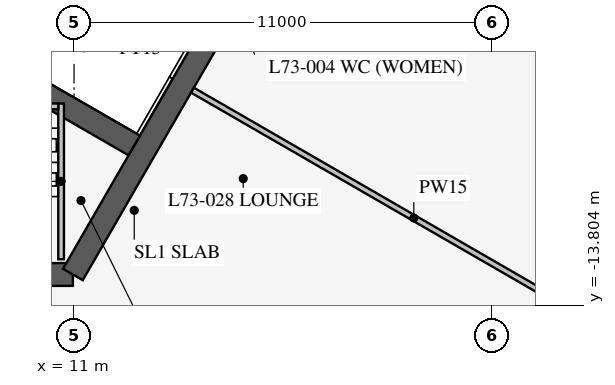
"""IFC4 building model, lengths in metres.
Left out: names, types, materials, properties, quantities, classifications, styles, units other than length and angle.
Written with IfcOpenShell. Run it as: python <this file> out.ifc"""

import sys

from ifc_helpers import new_model, si_unit, direction, frame, frame_2d, origin, place, context, subcontext, project, spatial, rectangle, extrude, element, save


model = new_model("IFC4")
c1 = context("Model", 3, precision=1e-05, world=origin(), true_north=direction((0.0, 1.0)))
c2 = subcontext(c1, "Body", "Model", "MODEL_VIEW")
j1 = project(units=[si_unit("LENGTHUNIT", "METRE"), si_unit("PLANEANGLEUNIT", "RADIAN")], contexts=[c1])
p1 = place(None, origin())
s1 = spatial("IfcSite", under=j1, at=p1, CompositionType="ELEMENT")
p2 = place(p1, origin())
s2 = spatial("IfcBuilding", under=s1, at=p2, CompositionType="ELEMENT")
p3 = place(p2, frame((0.0, 0.0, 318.3)))
s3 = spatial("IfcBuildingStorey", under=s2, at=p3, CompositionType="ELEMENT", Elevation=318.3)
p4 = place(p3, frame((-10.97, -13.0, 0.0), z_axis=(0.0, 0.0, 1.0), x_axis=(1.0, 0.0, 0.0)))
e1 = element("IfcWall", 1, at=p4, inside=s3, PredefinedType="SHEAR", context=c2, shape_type="SweptSolid", body=[
    extrude(rectangle(XDim=21.939, YDim=0.6, at=frame_2d((10.97, 0.0))), origin(), (0.0, 0.0, 1.0), 4.2),
])
p5 = place(p4, frame((17.27, 0.0, 0.0)))
e2 = element("IfcOpeningElement", 2, at=p5, cuts=e1, PredefinedType="OPENING", context=c2, shape_type="SweptSolid", body=[
    extrude(rectangle(XDim=1.2, YDim=2.1, at=frame_2d((0.6, 1.05))), frame((0.0, 0.31, 0.0), z_axis=(0.0, -1.0, 0.0), x_axis=(1.0, 0.0, 0.0)), (0.0, 0.0, 1.0), 0.62),
])
p6 = place(p4, frame((3.47, 0.0, 0.0)))
e3 = element("IfcOpeningElement", 3, at=p6, cuts=e1, PredefinedType="OPENING", context=c2, shape_type="SweptSolid", body=[
    extrude(rectangle(XDim=1.2, YDim=2.1, at=frame_2d((0.6, 1.05))), frame((0.0, 0.31, 0.0), z_axis=(0.0, -1.0, 0.0), x_axis=(1.0, 0.0, 0.0)), (0.0, 0.0, 1.0), 0.62),
])
p7 = place(p3, frame((10.97, -13.0, 0.0), z_axis=(0.0, 0.0, 1.0), x_axis=(0.499995765644, 0.866027848477, 0.0)))
e4 = element("IfcWall", 4, at=p7, inside=s3, PredefinedType="SHEAR", context=c2, shape_type="SweptSolid", body=[
    extrude(rectangle(XDim=11.547, YDim=0.6, at=frame_2d((5.773, 0.0))), origin(), (0.0, 0.0, 1.0), 4.2),
])
p8 = place(p3, frame((4.638, -5.016, 0.0), z_axis=(0.0, 0.0, 1.0), x_axis=(0.866012320003, -0.50002266109, 0.0)))
e5 = element("IfcWall", 5, at=p8, inside=s3, PredefinedType="SHEAR", context=c2, shape_type="SweptSolid", body=[
    extrude(rectangle(XDim=9.175, YDim=0.6, at=frame_2d((4.587, 0.0))), origin(), (0.0, 0.0, 1.0), 4.2),
])
p9 = place(p3, frame((10.66, -8.5, 0.0), z_axis=(0.0, 0.0, 1.0), x_axis=(0.0, -1.0, 0.0)))
e6 = element("IfcWall", 6, at=p9, inside=s3, PredefinedType="PARTITIONING", context=c2, shape_type="SweptSolid", body=[
    extrude(rectangle(XDim=4.1, YDim=0.15, at=frame_2d((2.05, 0.0))), origin(), (0.0, 0.0, 1.0), 4.0),
])
p10 = place(p3, frame((8.075, -8.575, 0.0), z_axis=(0.0, 0.0, 1.0), x_axis=(1.0, 0.0, 0.0)))
e7 = element("IfcWall", 7, at=p10, inside=s3, PredefinedType="PARTITIONING", context=c2, shape_type="SweptSolid", body=[
    extrude(rectangle(XDim=2.51, YDim=0.15, at=frame_2d((1.255, 0.0))), origin(), (0.0, 0.0, 1.0), 4.0),
])
p11 = place(p3, frame((14.116, -8.15, 0.0), z_axis=(0.0, 0.0, 1.0), x_axis=(0.866020541135, -0.500008422262, 0.0)))
e8 = element("IfcWall", 8, at=p11, inside=s3, PredefinedType="PARTITIONING", context=c2, shape_type="SweptSolid", body=[
    extrude(rectangle(XDim=13.45, YDim=0.15, at=frame_2d((6.725, 0.0))), origin(), (0.0, 0.0, 1.0), 2.0),
])
save(model, sys.argv[1])
